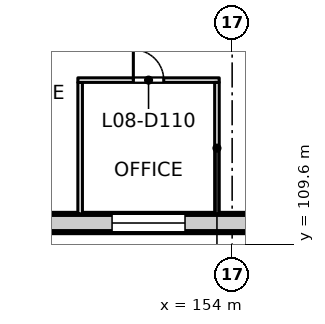
"""IFC4 building model, lengths in metres.
Left out: names, types, materials, properties, quantities, classifications, styles, units other than length and angle.
Written with IfcOpenShell. Run it as: python <this file> out.ifc"""

import sys

from ifc_helpers import new_model, si_unit, direction, frame, frame_2d, origin, place, context, subcontext, project, spatial, rectangle, extrude, element, fill, save


model = new_model("IFC4")
c1 = context("Model", 3, precision=1e-05, world=origin(), true_north=direction((0.0, 1.0)))
c2 = subcontext(c1, "Body", "Model", "MODEL_VIEW")
j1 = project(units=[si_unit("LENGTHUNIT", "METRE"), si_unit("PLANEANGLEUNIT", "RADIAN")], contexts=[c1])
p1 = place(None, origin())
s1 = spatial("IfcSite", under=j1, at=p1, CompositionType="ELEMENT")
p2 = place(p1, origin())
s2 = spatial("IfcBuilding", under=s1, at=p2, CompositionType="ELEMENT")
p3 = place(p2, frame((0.0, 0.0, 39.5)))
s3 = spatial("IfcBuildingStorey", under=s2, at=p3, CompositionType="ELEMENT", Elevation=39.5)
p4 = place(p3, frame((162.93, 110.3, 0.0), z_axis=(0.0, 0.0, 1.0), x_axis=(-1.0, 0.0, 0.0)))
e1 = element("IfcWall", 1, at=p4, inside=s3, PredefinedType="SOLIDWALL", context=c2, shape_type="SweptSolid", body=[
    extrude(rectangle(XDim=31.93, YDim=0.6, at=frame_2d((15.965, 0.0))), origin(), (0.0, 0.0, 1.0), 3.625),
])
p5 = place(p4, frame((1.48, 0.0, 0.9)))
e2 = element("IfcOpeningElement", 2, at=p5, cuts=e1, PredefinedType="OPENING", context=c2, shape_type="SweptSolid", body=[
    extrude(rectangle(XDim=2.4, YDim=2.4, at=frame_2d((1.2, 1.2))), frame((0.0, 0.31, 0.0), z_axis=(0.0, -1.0, 0.0), x_axis=(1.0, 0.0, 0.0)), (0.0, 0.0, 1.0), 0.62),
])
p6 = place(p4, frame((5.98, 0.0, 0.9)))
e3 = element("IfcOpeningElement", 3, at=p6, cuts=e1, PredefinedType="OPENING", context=c2, shape_type="SweptSolid", body=[
    extrude(rectangle(XDim=2.4, YDim=2.4, at=frame_2d((1.2, 1.2))), frame((0.0, 0.31, 0.0), z_axis=(0.0, -1.0, 0.0), x_axis=(1.0, 0.0, 0.0)), (0.0, 0.0, 1.0), 0.62),
])
p7 = place(p4, frame((10.48, 0.0, 0.9)))
e4 = element("IfcOpeningElement", 4, at=p7, cuts=e1, PredefinedType="OPENING", context=c2, shape_type="SweptSolid", body=[
    extrude(rectangle(XDim=2.4, YDim=2.4, at=frame_2d((1.2, 1.2))), frame((0.0, 0.31, 0.0), z_axis=(0.0, -1.0, 0.0), x_axis=(1.0, 0.0, 0.0)), (0.0, 0.0, 1.0), 0.62),
])
p8 = place(p4, frame((14.98, 0.0, 0.9)))
e5 = element("IfcOpeningElement", 5, at=p8, cuts=e1, PredefinedType="OPENING", context=c2, shape_type="SweptSolid", body=[
    extrude(rectangle(XDim=2.4, YDim=2.4, at=frame_2d((1.2, 1.2))), frame((0.0, 0.31, 0.0), z_axis=(0.0, -1.0, 0.0), x_axis=(1.0, 0.0, 0.0)), (0.0, 0.0, 1.0), 0.62),
])
p9 = place(p4, frame((19.48, 0.0, 0.9)))
e6 = element("IfcOpeningElement", 6, at=p9, cuts=e1, PredefinedType="OPENING", context=c2, shape_type="SweptSolid", body=[
    extrude(rectangle(XDim=2.4, YDim=2.4, at=frame_2d((1.2, 1.2))), frame((0.0, 0.31, 0.0), z_axis=(0.0, -1.0, 0.0), x_axis=(1.0, 0.0, 0.0)), (0.0, 0.0, 1.0), 0.62),
])
p10 = place(p4, frame((23.98, 0.0, 0.9)))
e7 = element("IfcOpeningElement", 7, at=p10, cuts=e1, PredefinedType="OPENING", context=c2, shape_type="SweptSolid", body=[
    extrude(rectangle(XDim=2.4, YDim=2.4, at=frame_2d((1.2, 1.2))), frame((0.0, 0.31, 0.0), z_axis=(0.0, -1.0, 0.0), x_axis=(1.0, 0.0, 0.0)), (0.0, 0.0, 1.0), 0.62),
])
p11 = place(p4, frame((28.48, 0.0, 0.9)))
e8 = element("IfcOpeningElement", 8, at=p11, cuts=e1, PredefinedType="OPENING", context=c2, shape_type="SweptSolid", body=[
    extrude(rectangle(XDim=2.4, YDim=2.4, at=frame_2d((1.2, 1.2))), frame((0.0, 0.31, 0.0), z_axis=(0.0, -1.0, 0.0), x_axis=(1.0, 0.0, 0.0)), (0.0, 0.0, 1.0), 0.62),
])
p12 = place(p3, frame((149.0, 110.6, 0.0), z_axis=(0.0, 0.0, 1.0), x_axis=(0.0, 1.0, 0.0)))
e9 = element("IfcWall", 9, at=p12, inside=s3, PredefinedType="PARTITIONING", context=c2, shape_type="SweptSolid", body=[
    extrude(rectangle(XDim=4.325, YDim=0.15, at=frame_2d((2.163, 0.0))), origin(), (0.0, 0.0, 1.0), 3.625),
])
p13 = place(p3, frame((148.925, 115.0, 0.0), z_axis=(0.0, 0.0, 1.0), x_axis=(1.0, 0.0, 0.0)))
e10 = element("IfcWall", 10, at=p13, inside=s3, PredefinedType="PARTITIONING", context=c2, shape_type="SweptSolid", body=[
    extrude(rectangle(XDim=4.65, YDim=0.15, at=frame_2d((2.325, 0.0))), origin(), (0.0, 0.0, 1.0), 3.625),
])
p14 = place(p13, frame((1.825, 0.0, 0.0)))
e11 = element("IfcOpeningElement", 11, at=p14, cuts=e10, PredefinedType="OPENING", context=c2, shape_type="SweptSolid", body=[
    extrude(rectangle(XDim=1.0, YDim=2.1, at=frame_2d((0.5, 1.05))), frame((0.0, 0.085, 0.0), z_axis=(0.0, -1.0, 0.0), x_axis=(1.0, 0.0, 0.0)), (0.0, 0.0, 1.0), 0.17),
])
p15 = place(p3, frame((153.5, 114.925, 0.0), z_axis=(0.0, 0.0, 1.0), x_axis=(0.0, -1.0, 0.0)))
e12 = element("IfcWall", 12, at=p15, inside=s3, PredefinedType="PARTITIONING", context=c2, shape_type="SweptSolid", body=[
    extrude(rectangle(XDim=4.325, YDim=0.15, at=frame_2d((2.163, 0.0))), origin(), (0.0, 0.0, 1.0), 3.625),
])
p16 = place(p7, origin())
e13 = element("IfcWindow", 13, at=p16, inside=s3, PartitioningType="SINGLE_PANEL", PredefinedType="WINDOW", context=c2, shape_type="SweptSolid", body=[
    extrude(rectangle(XDim=2.4, YDim=2.4, at=frame_2d((1.2, 1.2))), frame((0.0, 0.03, 0.0), z_axis=(0.0, -1.0, 0.0), x_axis=(1.0, 0.0, 0.0)), (0.0, 0.0, 1.0), 0.06),
])
fill(e4, e13)
p17 = place(p14, origin())
e14 = element("IfcDoor", 14, at=p17, inside=s3, OperationType="SINGLE_SWING_LEFT", PredefinedType="DOOR", context=c2, shape_type="SweptSolid", body=[
    extrude(rectangle(XDim=1.0, YDim=2.1, at=frame_2d((0.5, 1.05))), frame((0.0, 0.025, 0.0), z_axis=(0.0, -1.0, 0.0), x_axis=(1.0, 0.0, 0.0)), (0.0, 0.0, 1.0), 0.05),
])
fill(e11, e14)
save(model, sys.argv[1])
